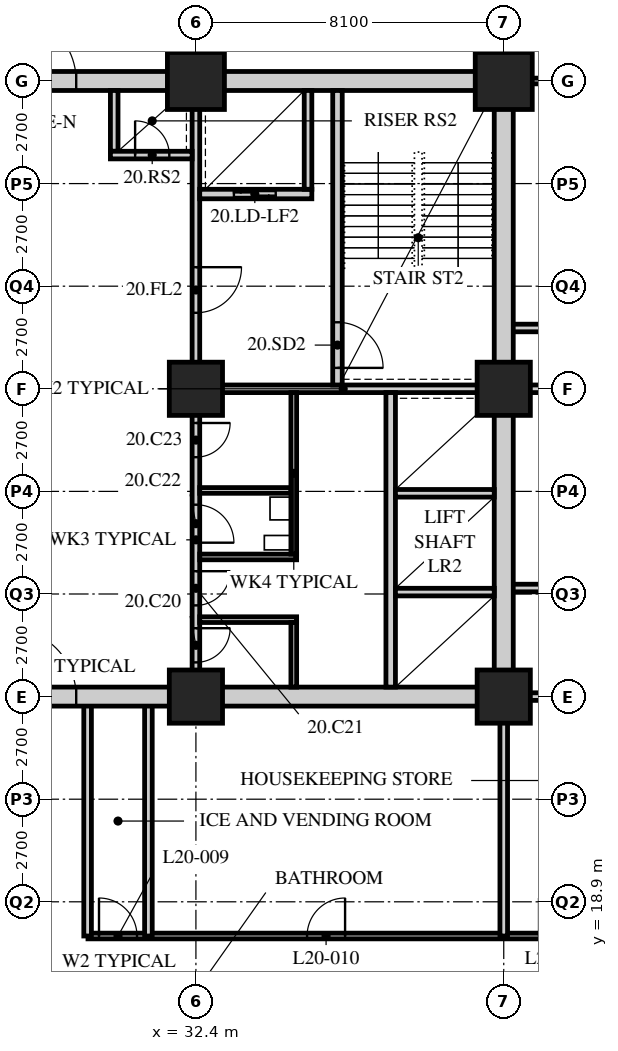
"""IFC4 building model, lengths in metres.
Left out: names, types, materials, properties, quantities, classifications, styles, units other than length and angle.
Written with IfcOpenShell. Run it as: python <this file> out.ifc"""

import sys

from ifc_helpers import new_model, si_unit, direction, frame, frame_2d, origin, origin_2d, place, context, subcontext, project, spatial, rectangle, hollow_rectangle, extrude, element, fill, save


model = new_model("IFC4")
c1 = context("Model", 3, precision=1e-05, world=origin(), true_north=direction((0.0, 1.0)))
c2 = subcontext(c1, "Body", "Model", "MODEL_VIEW")
j1 = project(units=[si_unit("LENGTHUNIT", "METRE"), si_unit("PLANEANGLEUNIT", "RADIAN")], contexts=[c1])
p1 = place(None, origin())
s1 = spatial("IfcSite", under=j1, at=p1, CompositionType="ELEMENT")
p2 = place(p1, origin())
s2 = spatial("IfcBuilding", under=s1, at=p2, CompositionType="ELEMENT")
p3 = place(p2, frame((0.0, 0.0, 80.6)))
s3 = spatial("IfcBuildingStorey", under=s2, at=p3, CompositionType="ELEMENT", Elevation=80.6)
for number, where, z_axis, x_axis in (
    (1, (32.4, 24.3, 0.0), (0.0, 0.0, 1.0), (1.0, 0.0, 0.0)),
    (2, (32.4, 32.4, 0.0), (0.0, 0.0, 1.0), (1.0, 0.0, 0.0)),
):
    element("IfcColumn", number, at=place(p3, frame(where, z_axis=z_axis, x_axis=x_axis)), inside=s3, PredefinedType="COLUMN", context=c2, shape_type="SweptSolid", body=[
        extrude(hollow_rectangle(XDim=1.4, YDim=1.4, WallThickness=0.12, at=origin_2d()), origin(), (0.0, 0.0, 1.0), 3.4),
    ])
p4 = place(p3, frame((32.4, 40.5, 0.0), z_axis=(0.0, 0.0, 1.0), x_axis=(1.0, 0.0, 0.0)))
e3 = element("IfcColumn", 3, at=p4, inside=s3, PredefinedType="COLUMN", context=c2, shape_type="SweptSolid", body=[
    extrude(hollow_rectangle(XDim=1.5, YDim=1.5, WallThickness=0.13, at=origin_2d()), origin(), (0.0, 0.0, 1.0), 3.4),
])
for number, where, z_axis, x_axis in (
    (4, (40.5, 24.3, 0.0), (0.0, 0.0, 1.0), (1.0, 0.0, 0.0)),
    (5, (40.5, 32.4, 0.0), (0.0, 0.0, 1.0), (1.0, 0.0, 0.0)),
):
    element("IfcColumn", number, at=place(p3, frame(where, z_axis=z_axis, x_axis=x_axis)), inside=s3, PredefinedType="COLUMN", context=c2, shape_type="SweptSolid", body=[
        extrude(hollow_rectangle(XDim=1.4, YDim=1.4, WallThickness=0.12, at=origin_2d()), origin(), (0.0, 0.0, 1.0), 3.4),
    ])
p5 = place(p3, frame((40.5, 40.5, 0.0), z_axis=(0.0, 0.0, 1.0), x_axis=(1.0, 0.0, 0.0)))
e6 = element("IfcColumn", 6, at=p5, inside=s3, PredefinedType="COLUMN", context=c2, shape_type="SweptSolid", body=[
    extrude(hollow_rectangle(XDim=1.5, YDim=1.5, WallThickness=0.13, at=origin_2d()), origin(), (0.0, 0.0, 1.0), 3.4),
])
p6 = place(p3, frame((46.8, 40.5, 0.0), z_axis=(0.0, 0.0, 1.0), x_axis=(-1.0, 0.0, 0.0)))
e7 = element("IfcWall", 7, at=p6, inside=s3, PredefinedType="PARTITIONING", context=c2, shape_type="SweptSolid", body=[
    extrude(rectangle(XDim=6.1, YDim=0.15, at=frame_2d((3.05, 0.0))), origin(), (0.0, 0.0, 1.0), 2.428),
])
p7 = place(p3, frame((29.56, 18.0, 0.0), z_axis=(0.0, 0.0, 1.0), x_axis=(1.0, 0.0, 0.0)))
e8 = element("IfcWall", 8, at=p7, inside=s3, PredefinedType="PARTITIONING", context=c2, shape_type="SweptSolid", body=[
    extrude(rectangle(XDim=17.24, YDim=0.15, at=frame_2d((8.62, 0.0))), origin(), (0.0, 0.0, 1.0), 3.19),
])
p8 = place(p7, frame((0.29, 0.0, 0.0)))
e9 = element("IfcOpeningElement", 9, at=p8, cuts=e8, PredefinedType="OPENING", context=c2, shape_type="SweptSolid", body=[
    extrude(rectangle(XDim=1.0, YDim=2.1, at=frame_2d((0.5, 1.05))), frame((0.0, 0.085, 0.0), z_axis=(0.0, -1.0, 0.0), x_axis=(1.0, 0.0, 0.0)), (0.0, 0.0, 1.0), 0.17),
])
p9 = place(p7, frame((5.765, 0.0, 0.0)))
e10 = element("IfcOpeningElement", 10, at=p9, cuts=e8, PredefinedType="OPENING", context=c2, shape_type="SweptSolid", body=[
    extrude(rectangle(XDim=1.0, YDim=2.1, at=frame_2d((0.5, 1.05))), frame((0.0, 0.085, 0.0), z_axis=(0.0, -1.0, 0.0), x_axis=(1.0, 0.0, 0.0)), (0.0, 0.0, 1.0), 0.17),
])
p10 = place(p7, frame((11.869, 0.0, 0.0)))
e11 = element("IfcOpeningElement", 11, at=p10, cuts=e8, PredefinedType="OPENING", context=c2, shape_type="SweptSolid", body=[
    extrude(rectangle(XDim=1.0, YDim=2.1, at=frame_2d((0.5, 1.05))), frame((0.0, 0.085, 0.0), z_axis=(0.0, -1.0, 0.0), x_axis=(1.0, 0.0, 0.0)), (0.0, 0.0, 1.0), 0.17),
])
p11 = place(p7, frame((15.019, 0.0, 0.0)))
e12 = element("IfcOpeningElement", 12, at=p11, cuts=e8, PredefinedType="OPENING", context=c2, shape_type="SweptSolid", body=[
    extrude(rectangle(XDim=1.0, YDim=2.1, at=frame_2d((0.5, 1.05))), frame((0.0, 0.085, 0.0), z_axis=(0.0, -1.0, 0.0), x_axis=(1.0, 0.0, 0.0)), (0.0, 0.0, 1.0), 0.17),
])
p12 = place(p3, frame((40.5, 32.4, 0.0), z_axis=(0.0, 0.0, 1.0), x_axis=(1.0, 0.0, 0.0)))
e13 = element("IfcWall", 13, at=p12, inside=s3, PredefinedType="SOLIDWALL", context=c2, shape_type="SweptSolid", body=[
    extrude(rectangle(XDim=6.3, YDim=0.2, at=frame_2d((3.15, 0.0))), origin(), (0.0, 0.0, 1.0), 2.428),
])
for number, where, z_axis, x_axis in (
    (14, (46.8, 27.157, 0.0), (0.0, 0.0, 1.0), (-1.0, 0.0, 0.0)),
    (15, (46.8, 34.0, 0.0), (0.0, 0.0, 1.0), (-1.0, 0.0, 0.0)),
):
    element("IfcWall", number, at=place(p3, frame(where, z_axis=z_axis, x_axis=x_axis)), inside=s3, PredefinedType="SOLIDWALL", context=c2, shape_type="SweptSolid", body=[
        extrude(rectangle(XDim=6.3, YDim=0.2, at=frame_2d((3.15, 0.0))), origin(), (0.0, 0.0, 1.0), 3.19),
    ])
p13 = place(p3, frame((40.5, 18.0, 0.0), z_axis=(0.0, 0.0, 1.0), x_axis=(0.0, 1.0, 0.0)))
e16 = element("IfcWall", 16, at=p13, inside=s3, PredefinedType="SOLIDWALL", context=c2, shape_type="SweptSolid", body=[
    extrude(rectangle(XDim=6.3, YDim=0.2, at=frame_2d((3.15, 0.0))), origin(), (0.0, 0.0, 1.0), 2.428),
])
for number, where, z_axis, x_axis in (
    (17, (31.15, 18.0, 0.0), (0.0, 0.0, 1.0), (0.0, 1.0, 0.0)),
    (18, (29.55, 18.0, 0.0), (0.0, 0.0, 1.0), (0.0, 1.0, 0.0)),
):
    element("IfcWall", number, at=place(p3, frame(where, z_axis=z_axis, x_axis=x_axis)), inside=s3, PredefinedType="SOLIDWALL", context=c2, shape_type="SweptSolid", body=[
        extrude(rectangle(XDim=6.3, YDim=0.2, at=frame_2d((3.15, 0.0))), origin(), (0.0, 0.0, 1.0), 3.19),
    ])
p14 = place(p3, frame((40.5, 24.3, 0.0), z_axis=(0.0, 0.0, 1.0), x_axis=(1.0, 0.0, 0.0)))
e19 = element("IfcWall", 19, at=p14, inside=s3, PredefinedType="SOLIDWALL", context=c2, shape_type="SweptSolid", body=[
    extrude(rectangle(XDim=6.3, YDim=0.2, at=frame_2d((3.15, 0.0))), origin(), (0.0, 0.0, 1.0), 2.428),
])
p15 = place(p3, frame((15.95, 24.3, 0.0), z_axis=(0.0, 0.0, 1.0), x_axis=(1.0, 0.0, 0.0)))
e20 = element("IfcWall", 20, at=p15, inside=s3, PredefinedType="SOLIDWALL", context=c2, shape_type="SweptSolid", body=[
    extrude(rectangle(XDim=24.8, YDim=0.5, at=frame_2d((12.4, 0.0))), origin(), (0.0, 0.0, 1.0), 2.428),
])
p16 = place(p15, frame((11.5, 0.0, 0.0)))
e21 = element("IfcOpeningElement", 21, at=p16, cuts=e20, PredefinedType="OPENING", context=c2, shape_type="SweptSolid", body=[
    extrude(rectangle(XDim=1.8, YDim=2.4, at=frame_2d((0.9, 1.2))), frame((0.0, 0.26, 0.0), z_axis=(0.0, -1.0, 0.0), x_axis=(1.0, 0.0, 0.0)), (0.0, 0.0, 1.0), 0.52),
])
p17 = place(p3, frame((15.95, 40.5, 0.0), z_axis=(0.0, 0.0, 1.0), x_axis=(1.0, 0.0, 0.0)))
e22 = element("IfcWall", 22, at=p17, inside=s3, PredefinedType="SOLIDWALL", context=c2, shape_type="SweptSolid", body=[
    extrude(rectangle(XDim=24.8, YDim=0.5, at=frame_2d((12.4, 0.0))), origin(), (0.0, 0.0, 1.0), 2.428),
])
p18 = place(p17, frame((11.5, 0.0, 0.0)))
e23 = element("IfcOpeningElement", 23, at=p18, cuts=e22, PredefinedType="OPENING", context=c2, shape_type="SweptSolid", body=[
    extrude(rectangle(XDim=1.8, YDim=2.4, at=frame_2d((0.9, 1.2))), frame((0.0, 0.26, 0.0), z_axis=(0.0, -1.0, 0.0), x_axis=(1.0, 0.0, 0.0)), (0.0, 0.0, 1.0), 0.52),
])
p19 = place(p3, frame((40.5, 24.55, 0.0), z_axis=(0.0, 0.0, 1.0), x_axis=(0.0, 1.0, 0.0)))
e24 = element("IfcWall", 24, at=p19, inside=s3, PredefinedType="SOLIDWALL", context=c2, shape_type="SweptSolid", body=[
    extrude(rectangle(XDim=15.7, YDim=0.5, at=frame_2d((7.85, 0.0))), origin(), (0.0, 0.0, 1.0), 2.428),
])
p20 = place(p3, frame((32.3, 32.4, 0.0), z_axis=(0.0, 0.0, 1.0), x_axis=(1.0, 0.0, 0.0)))
e25 = element("IfcWall", 25, at=p20, inside=s3, PredefinedType="SOLIDWALL", context=c2, shape_type="SweptSolid", body=[
    extrude(rectangle(XDim=7.95, YDim=0.2, at=frame_2d((3.975, 0.0))), origin(), (0.0, 0.0, 1.0), 2.578),
])
p21 = place(p3, frame((32.4, 32.5, 0.0), z_axis=(0.0, 0.0, 1.0), x_axis=(0.0, 1.0, 0.0)))
e26 = element("IfcWall", 26, at=p21, inside=s3, PredefinedType="SOLIDWALL", context=c2, shape_type="SweptSolid", body=[
    extrude(rectangle(XDim=7.75, YDim=0.2, at=frame_2d((3.875, 0.0))), origin(), (0.0, 0.0, 1.0), 2.578),
])
p22 = place(p21, frame((1.9, 0.0, 0.0)))
e27 = element("IfcOpeningElement", 27, at=p22, cuts=e26, PredefinedType="OPENING", context=c2, shape_type="SweptSolid", body=[
    extrude(rectangle(XDim=1.2, YDim=2.1, at=frame_2d((0.6, 1.05))), frame((0.0, 0.11, 0.0), z_axis=(0.0, -1.0, 0.0), x_axis=(1.0, 0.0, 0.0)), (0.0, 0.0, 1.0), 0.22),
])
p23 = place(p3, frame((37.525, 24.55, 0.0), z_axis=(0.0, 0.0, 1.0), x_axis=(0.0, 1.0, 0.0)))
e28 = element("IfcWall", 28, at=p23, inside=s3, PredefinedType="SOLIDWALL", context=c2, shape_type="SweptSolid", body=[
    extrude(rectangle(XDim=7.75, YDim=0.25, at=frame_2d((3.875, 0.0))), origin(), (0.0, 0.0, 1.0), 3.19),
])
for number, where, z_axis, x_axis in (
    (29, (37.65, 27.05, 0.0), (0.0, 0.0, 1.0), (1.0, 0.0, 0.0)),
    (30, (37.65, 29.65, 0.0), (0.0, 0.0, 1.0), (1.0, 0.0, 0.0)),
):
    element("IfcWall", number, at=place(p3, frame(where, z_axis=z_axis, x_axis=x_axis)), inside=s3, PredefinedType="SOLIDWALL", context=c2, shape_type="SweptSolid", body=[
        extrude(rectangle(XDim=2.6, YDim=0.2, at=frame_2d((1.3, 0.0))), origin(), (0.0, 0.0, 1.0), 3.19),
    ])
p24 = place(p3, frame((36.125, 32.5, 0.0), z_axis=(0.0, 0.0, 1.0), x_axis=(0.0, 1.0, 0.0)))
e31 = element("IfcWall", 31, at=p24, inside=s3, PredefinedType="SOLIDWALL", context=c2, shape_type="SweptSolid", body=[
    extrude(rectangle(XDim=7.75, YDim=0.25, at=frame_2d((3.875, 0.0))), origin(), (0.0, 0.0, 1.0), 3.19),
])
p25 = place(p24, frame((0.45, 0.0, 0.0)))
e32 = element("IfcOpeningElement", 32, at=p25, cuts=e31, PredefinedType="OPENING", context=c2, shape_type="SweptSolid", body=[
    extrude(rectangle(XDim=1.2, YDim=2.1, at=frame_2d((0.6, 1.05))), frame((0.0, 0.135, 0.0), z_axis=(0.0, -1.0, 0.0), x_axis=(1.0, 0.0, 0.0)), (0.0, 0.0, 1.0), 0.27),
])
p26 = place(p3, frame((32.5, 37.525, 0.0), z_axis=(0.0, 0.0, 1.0), x_axis=(1.0, 0.0, 0.0)))
e33 = element("IfcWall", 33, at=p26, inside=s3, PredefinedType="SOLIDWALL", context=c2, shape_type="SweptSolid", body=[
    extrude(rectangle(XDim=2.95, YDim=0.25, at=frame_2d((1.475, 0.0))), origin(), (0.0, 0.0, 1.0), 3.19),
])
p27 = place(p26, frame((0.9, 0.0, 0.0)))
e34 = element("IfcOpeningElement", 34, at=p27, cuts=e33, PredefinedType="OPENING", context=c2, shape_type="SweptSolid", body=[
    extrude(rectangle(XDim=1.1, YDim=2.4, at=frame_2d((0.55, 1.2))), frame((0.0, 0.135, 0.0), z_axis=(0.0, -1.0, 0.0), x_axis=(1.0, 0.0, 0.0)), (0.0, 0.0, 1.0), 0.27),
])
p28 = place(p3, frame((35.35, 37.65, 0.0), z_axis=(0.0, 0.0, 1.0), x_axis=(0.0, 1.0, 0.0)))
e35 = element("IfcWall", 35, at=p28, inside=s3, PredefinedType="SOLIDWALL", context=c2, shape_type="SweptSolid", body=[
    extrude(rectangle(XDim=2.6, YDim=0.2, at=frame_2d((1.3, 0.0))), origin(), (0.0, 0.0, 1.0), 3.19),
])
p29 = place(p3, frame((30.25, 38.65, 0.0), z_axis=(0.0, 0.0, 1.0), x_axis=(0.0, 1.0, 0.0)))
e36 = element("IfcWall", 36, at=p29, inside=s3, PredefinedType="SOLIDWALL", context=c2, shape_type="SweptSolid", body=[
    extrude(rectangle(XDim=1.6, YDim=0.2, at=frame_2d((0.8, 0.0))), origin(), (0.0, 0.0, 1.0), 3.19),
])
p30 = place(p3, frame((30.15, 38.55, 0.0), z_axis=(0.0, 0.0, 1.0), x_axis=(1.0, 0.0, 0.0)))
e37 = element("IfcWall", 37, at=p30, inside=s3, PredefinedType="SOLIDWALL", context=c2, shape_type="SweptSolid", body=[
    extrude(rectangle(XDim=2.15, YDim=0.2, at=frame_2d((1.075, 0.0))), origin(), (0.0, 0.0, 1.0), 3.19),
])
p31 = place(p30, frame((0.65, 0.0, 0.0)))
e38 = element("IfcOpeningElement", 38, at=p31, cuts=e37, PredefinedType="OPENING", context=c2, shape_type="SweptSolid", body=[
    extrude(rectangle(XDim=0.9, YDim=2.1, at=frame_2d((0.45, 1.05))), frame((0.0, 0.11, 0.0), z_axis=(0.0, -1.0, 0.0), x_axis=(1.0, 0.0, 0.0)), (0.0, 0.0, 1.0), 0.22),
])
p32 = place(p3, frame((32.4, 24.55, 0.0), z_axis=(0.0, 0.0, 1.0), x_axis=(0.0, 1.0, 0.0)))
e39 = element("IfcWall", 39, at=p32, inside=s3, PredefinedType="PARTITIONING", context=c2, shape_type="SweptSolid", body=[
    extrude(rectangle(XDim=7.75, YDim=0.2, at=frame_2d((3.875, 0.0))), origin(), (0.0, 0.0, 1.0), 2.578),
])
p33 = place(p32, frame((0.65, 0.0, 0.0)))
e40 = element("IfcOpeningElement", 40, at=p33, cuts=e39, PredefinedType="OPENING", context=c2, shape_type="SweptSolid", body=[
    extrude(rectangle(XDim=0.9, YDim=2.1, at=frame_2d((0.45, 1.05))), frame((0.0, 0.11, 0.0), z_axis=(0.0, -1.0, 0.0), x_axis=(1.0, 0.0, 0.0)), (0.0, 0.0, 1.0), 0.22),
])
p34 = place(p32, frame((2.15, 0.0, 0.0)))
e41 = element("IfcOpeningElement", 41, at=p34, cuts=e39, PredefinedType="OPENING", context=c2, shape_type="SweptSolid", body=[
    extrude(rectangle(XDim=0.9, YDim=2.1, at=frame_2d((0.45, 1.05))), frame((0.0, 0.11, 0.0), z_axis=(0.0, -1.0, 0.0), x_axis=(1.0, 0.0, 0.0)), (0.0, 0.0, 1.0), 0.22),
])
p35 = place(p32, frame((3.8, 0.0, 0.0)))
e42 = element("IfcOpeningElement", 42, at=p35, cuts=e39, PredefinedType="OPENING", context=c2, shape_type="SweptSolid", body=[
    extrude(rectangle(XDim=1.0, YDim=2.1, at=frame_2d((0.5, 1.05))), frame((0.0, 0.11, 0.0), z_axis=(0.0, -1.0, 0.0), x_axis=(1.0, 0.0, 0.0)), (0.0, 0.0, 1.0), 0.22),
])
p36 = place(p32, frame((6.05, 0.0, 0.0)))
e43 = element("IfcOpeningElement", 43, at=p36, cuts=e39, PredefinedType="OPENING", context=c2, shape_type="SweptSolid", body=[
    extrude(rectangle(XDim=0.9, YDim=2.1, at=frame_2d((0.45, 1.05))), frame((0.0, 0.11, 0.0), z_axis=(0.0, -1.0, 0.0), x_axis=(1.0, 0.0, 0.0)), (0.0, 0.0, 1.0), 0.22),
])
for number, where, z_axis, x_axis in (
    (44, (32.5, 26.325, 0.0), (0.0, 0.0, 1.0), (1.0, 0.0, 0.0)),
    (45, (32.5, 27.975, 0.0), (0.0, 0.0, 1.0), (1.0, 0.0, 0.0)),
):
    element("IfcWall", number, at=place(p3, frame(where, z_axis=z_axis, x_axis=x_axis)), inside=s3, PredefinedType="PARTITIONING", context=c2, shape_type="SweptSolid", body=[
        extrude(rectangle(XDim=2.55, YDim=0.15, at=frame_2d((1.275, 0.0))), origin(), (0.0, 0.0, 1.0), 3.19),
    ])
p37 = place(p3, frame((32.5, 29.725, 0.0), z_axis=(0.0, 0.0, 1.0), x_axis=(1.0, 0.0, 0.0)))
e46 = element("IfcWall", 46, at=p37, inside=s3, PredefinedType="PARTITIONING", context=c2, shape_type="SweptSolid", body=[
    extrude(rectangle(XDim=2.4, YDim=0.15, at=frame_2d((1.2, 0.0))), origin(), (0.0, 0.0, 1.0), 3.19),
])
p38 = place(p3, frame((34.975, 24.55, 0.0), z_axis=(0.0, 0.0, 1.0), x_axis=(0.0, 1.0, 0.0)))
e47 = element("IfcWall", 47, at=p38, inside=s3, PredefinedType="PARTITIONING", context=c2, shape_type="SweptSolid", body=[
    extrude(rectangle(XDim=1.7, YDim=0.15, at=frame_2d((0.85, 0.0))), origin(), (0.0, 0.0, 1.0), 3.19),
])
p39 = place(p3, frame((34.975, 28.05, 0.0), z_axis=(0.0, 0.0, 1.0), x_axis=(0.0, 1.0, 0.0)))
e48 = element("IfcWall", 48, at=p39, inside=s3, PredefinedType="PARTITIONING", context=c2, shape_type="SweptSolid", body=[
    extrude(rectangle(XDim=4.25, YDim=0.15, at=frame_2d((2.125, 0.0))), origin(), (0.0, 0.0, 1.0), 3.19),
])
p40 = place(p8, origin())
e49 = element("IfcDoor", 49, at=p40, inside=s3, OperationType="SINGLE_SWING_LEFT", PredefinedType="DOOR", context=c2, shape_type="SweptSolid", body=[
    extrude(rectangle(XDim=1.0, YDim=2.1, at=frame_2d((0.5, 1.05))), frame((0.0, 0.025, 0.0), z_axis=(0.0, -1.0, 0.0), x_axis=(1.0, 0.0, 0.0)), (0.0, 0.0, 1.0), 0.05),
])
fill(e9, e49)
p41 = place(p9, origin())
e50 = element("IfcDoor", 50, at=p41, inside=s3, OperationType="SINGLE_SWING_RIGHT", PredefinedType="DOOR", context=c2, shape_type="SweptSolid", body=[
    extrude(rectangle(XDim=1.0, YDim=2.1, at=frame_2d((0.5, 1.05))), frame((0.0, 0.025, 0.0), z_axis=(0.0, -1.0, 0.0), x_axis=(1.0, 0.0, 0.0)), (0.0, 0.0, 1.0), 0.05),
])
fill(e10, e50)
p42 = place(p33, origin())
e51 = element("IfcDoor", 51, at=p42, inside=s3, OperationType="SINGLE_SWING_LEFT", PredefinedType="DOOR", context=c2, shape_type="SweptSolid", body=[
    extrude(rectangle(XDim=0.9, YDim=2.1, at=frame_2d((0.45, 1.05))), frame((0.0, 0.025, 0.0), z_axis=(0.0, -1.0, 0.0), x_axis=(1.0, 0.0, 0.0)), (0.0, 0.0, 1.0), 0.05),
])
fill(e40, e51)
p43 = place(p34, origin())
e52 = element("IfcDoor", 52, at=p43, inside=s3, OperationType="SINGLE_SWING_LEFT", PredefinedType="DOOR", context=c2, shape_type="SweptSolid", body=[
    extrude(rectangle(XDim=0.9, YDim=2.1, at=frame_2d((0.45, 1.05))), frame((0.0, 0.025, 0.0), z_axis=(0.0, -1.0, 0.0), x_axis=(1.0, 0.0, 0.0)), (0.0, 0.0, 1.0), 0.05),
])
fill(e41, e52)
p44 = place(p35, origin())
e53 = element("IfcDoor", 53, at=p44, inside=s3, OperationType="SINGLE_SWING_RIGHT", PredefinedType="DOOR", context=c2, shape_type="SweptSolid", body=[
    extrude(rectangle(XDim=1.0, YDim=2.1, at=frame_2d((0.5, 1.05))), frame((0.0, 0.025, 0.0), z_axis=(0.0, -1.0, 0.0), x_axis=(1.0, 0.0, 0.0)), (0.0, 0.0, 1.0), 0.05),
])
fill(e42, e53)
p45 = place(p36, origin())
e54 = element("IfcDoor", 54, at=p45, inside=s3, OperationType="SINGLE_SWING_LEFT", PredefinedType="DOOR", context=c2, shape_type="SweptSolid", body=[
    extrude(rectangle(XDim=0.9, YDim=2.1, at=frame_2d((0.45, 1.05))), frame((0.0, 0.025, 0.0), z_axis=(0.0, -1.0, 0.0), x_axis=(1.0, 0.0, 0.0)), (0.0, 0.0, 1.0), 0.05),
])
fill(e43, e54)
p46 = place(p25, origin())
e55 = element("IfcDoor", 55, at=p46, inside=s3, OperationType="SINGLE_SWING_RIGHT", PredefinedType="DOOR", context=c2, shape_type="SweptSolid", body=[
    extrude(rectangle(XDim=1.2, YDim=2.1, at=frame_2d((0.6, 1.05))), frame((0.0, 0.025, 0.0), z_axis=(0.0, -1.0, 0.0), x_axis=(1.0, 0.0, 0.0)), (0.0, 0.0, 1.0), 0.05),
])
fill(e32, e55)
p47 = place(p22, origin())
e56 = element("IfcDoor", 56, at=p47, inside=s3, OperationType="SINGLE_SWING_LEFT", PredefinedType="DOOR", context=c2, shape_type="SweptSolid", body=[
    extrude(rectangle(XDim=1.2, YDim=2.1, at=frame_2d((0.6, 1.05))), frame((0.0, 0.025, 0.0), z_axis=(0.0, -1.0, 0.0), x_axis=(1.0, 0.0, 0.0)), (0.0, 0.0, 1.0), 0.05),
])
fill(e27, e56)
p48 = place(p31, origin())
e57 = element("IfcDoor", 57, at=p48, inside=s3, OperationType="SINGLE_SWING_LEFT", PredefinedType="DOOR", context=c2, shape_type="SweptSolid", body=[
    extrude(rectangle(XDim=0.9, YDim=2.1, at=frame_2d((0.45, 1.05))), frame((0.0, 0.025, 0.0), z_axis=(0.0, -1.0, 0.0), x_axis=(1.0, 0.0, 0.0)), (0.0, 0.0, 1.0), 0.05),
])
fill(e38, e57)
p49 = place(p27, origin())
e58 = element("IfcDoor", 58, at=p49, inside=s3, OperationType="DOUBLE_DOOR_SLIDING", PredefinedType="DOOR", context=c2, shape_type="SweptSolid", body=[
    extrude(rectangle(XDim=1.1, YDim=2.4, at=frame_2d((0.55, 1.2))), frame((0.0, 0.025, 0.0), z_axis=(0.0, -1.0, 0.0), x_axis=(1.0, 0.0, 0.0)), (0.0, 0.0, 1.0), 0.05),
])
fill(e34, e58)
p50 = place(p16, origin())
e59 = element("IfcDoor", 59, at=p50, inside=s3, OperationType="DOUBLE_DOOR_SINGLE_SWING", PredefinedType="DOOR", context=c2, shape_type="SweptSolid", body=[
    extrude(rectangle(XDim=1.8, YDim=2.4, at=frame_2d((0.9, 1.2))), frame((0.0, 0.025, 0.0), z_axis=(0.0, -1.0, 0.0), x_axis=(1.0, 0.0, 0.0)), (0.0, 0.0, 1.0), 0.05),
])
fill(e21, e59)
p51 = place(p18, origin())
e60 = element("IfcDoor", 60, at=p51, inside=s3, OperationType="DOUBLE_DOOR_SINGLE_SWING", PredefinedType="DOOR", context=c2, shape_type="SweptSolid", body=[
    extrude(rectangle(XDim=1.8, YDim=2.4, at=frame_2d((0.9, 1.2))), frame((0.0, 0.025, 0.0), z_axis=(0.0, -1.0, 0.0), x_axis=(1.0, 0.0, 0.0)), (0.0, 0.0, 1.0), 0.05),
])
fill(e23, e60)
save(model, sys.argv[1])
